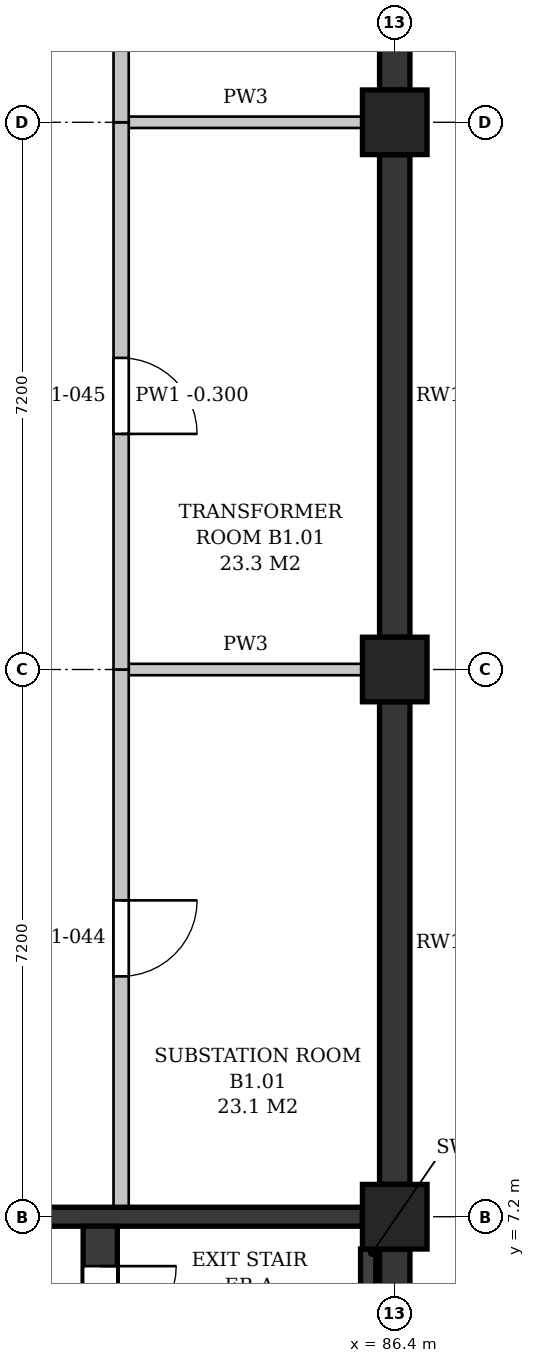
"""IFC4 building model, lengths in metres.
Left out: names, types, materials, properties, quantities, classifications, styles, units other than length and angle.
Written with IfcOpenShell. Run it as: python <this file> out.ifc"""

import sys

from ifc_helpers import new_model, si_unit, direction, frame, frame_2d, origin, origin_2d, place, context, subcontext, project, spatial, polyline, rectangle, outline, extrude, element, fill, save


model = new_model("IFC4")
c1 = context("Model", 3, precision=1e-05, world=origin(), true_north=direction((0.0, 1.0)))
c2 = subcontext(c1, "Body", "Model", "MODEL_VIEW")
j1 = project(units=[si_unit("LENGTHUNIT", "METRE"), si_unit("PLANEANGLEUNIT", "RADIAN")], contexts=[c1])
p1 = place(None, origin())
s1 = spatial("IfcSite", under=j1, at=p1, CompositionType="ELEMENT")
p2 = place(p1, origin())
s2 = spatial("IfcBuilding", under=s1, at=p2, CompositionType="ELEMENT")
p3 = place(p2, frame((0.0, 0.0, -4.5)))
s3 = spatial("IfcBuildingStorey", under=s2, at=p3, CompositionType="ELEMENT", Elevation=-4.5)
for number, where, z_axis, x_axis in (
    (1, (86.4, 7.2, 0.0), (0.0, 0.0, 1.0), (1.0, 0.0, 0.0)),
    (2, (86.4, 14.4, 0.0), (0.0, 0.0, 1.0), (1.0, 0.0, 0.0)),
    (3, (86.4, 21.6, 0.0), (0.0, 0.0, 1.0), (1.0, 0.0, 0.0)),
):
    element("IfcColumn", number, at=place(p3, frame(where, z_axis=z_axis, x_axis=x_axis)), inside=s3, PredefinedType="COLUMN", context=c2, shape_type="SweptSolid", body=[
        extrude(rectangle(XDim=0.85, YDim=0.85, at=origin_2d()), origin(), (0.0, 0.0, 1.0), 4.5),
    ])
p4 = place(p3, frame((86.4, 0.425, 0.0), z_axis=(0.0, 0.0, 1.0), x_axis=(0.0, 1.0, 0.0)))
e4 = element("IfcWall", 4, at=p4, inside=s3, PredefinedType="SOLIDWALL", context=c2, shape_type="SweptSolid", body=[
    extrude(rectangle(XDim=6.35, YDim=0.4, at=frame_2d((3.175, 0.0))), origin(), (0.0, 0.0, 1.0), 3.6),
])
for number, where, z_axis, x_axis in (
    (5, (86.4, 7.625, 0.0), (0.0, 0.0, 1.0), (0.0, 1.0, 0.0)),
    (6, (86.4, 14.825, 0.0), (0.0, 0.0, 1.0), (0.0, 1.0, 0.0)),
    (7, (86.4, 22.025, 0.0), (0.0, 0.0, 1.0), (0.0, 1.0, 0.0)),
):
    element("IfcWall", number, at=place(p3, frame(where, z_axis=z_axis, x_axis=x_axis)), inside=s3, PredefinedType="SOLIDWALL", context=c2, shape_type="SweptSolid", body=[
        extrude(rectangle(XDim=6.35, YDim=0.4, at=frame_2d((3.175, 0.0))), origin(), (0.0, 0.0, 1.0), 3.6),
    ])
p5 = place(p3, frame((79.625, 7.2, 0.0), z_axis=(0.0, 0.0, 1.0), x_axis=(1.0, 0.0, 0.0)))
e8 = element("IfcWall", 8, at=p5, inside=s3, PredefinedType="SHEAR", context=c2, shape_type="SweptSolid", body=[
    extrude(rectangle(XDim=6.35, YDim=0.25, at=frame_2d((3.175, 0.0))), origin(), (0.0, 0.0, 1.0), 3.4),
])
p6 = place(p5, frame((0.425, 0.0, 0.0)))
e9 = element("IfcOpeningElement", 9, at=p6, cuts=e8, PredefinedType="OPENING", context=c2, shape_type="SweptSolid", body=[
    extrude(rectangle(XDim=1.1, YDim=2.1, at=frame_2d((0.55, 1.05))), frame((0.0, 0.135, 0.0), z_axis=(0.0, -1.0, 0.0), x_axis=(1.0, 0.0, 0.0)), (0.0, 0.0, 1.0), 0.27),
])
p7 = place(p3, frame((86.05, 0.425, 0.0), z_axis=(0.0, 0.0, 1.0), x_axis=(0.0, 1.0, 0.0)))
e10 = element("IfcWall", 10, at=p7, inside=s3, PredefinedType="SHEAR", context=c2, shape_type="SweptSolid", body=[
    extrude(rectangle(XDim=6.35, YDim=0.2, at=frame_2d((3.175, 0.0))), origin(), (0.0, 0.0, 1.0), 4.2),
])
p8 = place(p3, frame((82.525, 0.2, 0.0), z_axis=(0.0, 0.0, 1.0), x_axis=(0.0, 1.0, 0.0)))
e11 = element("IfcWall", 11, at=p8, inside=s3, PredefinedType="SHEAR", context=c2, shape_type="SweptSolid", body=[
    extrude(rectangle(XDim=6.875, YDim=0.45, at=frame_2d((3.438, 0.0))), origin(), (0.0, 0.0, 1.0), 4.2),
])
p9 = place(p8, frame((5.35, 0.0, 0.0)))
e12 = element("IfcOpeningElement", 12, at=p9, cuts=e11, PredefinedType="OPENING", context=c2, shape_type="SweptSolid", body=[
    extrude(rectangle(XDim=1.0, YDim=2.1, at=frame_2d((0.5, 1.05))), frame((0.0, 0.235, 0.0), z_axis=(0.0, -1.0, 0.0), x_axis=(1.0, 0.0, 0.0)), (0.0, 0.0, 1.0), 0.47),
])
for number, where, z_axis, x_axis in (
    (13, (82.9, 14.4, 0.0), (0.0, 0.0, 1.0), (1.0, 0.0, 0.0)),
    (14, (82.9, 21.6, 0.0), (0.0, 0.0, 1.0), (1.0, 0.0, 0.0)),
):
    element("IfcWall", number, at=place(p3, frame(where, z_axis=z_axis, x_axis=x_axis)), inside=s3, PredefinedType="PARTITIONING", context=c2, shape_type="SweptSolid", body=[
        extrude(rectangle(XDim=3.075, YDim=0.15, at=frame_2d((1.538, 0.0))), origin(), (0.0, 0.0, 1.0), 3.4),
    ])
p10 = place(p3, frame((82.8, 7.325, 0.0), z_axis=(0.0, 0.0, 1.0), x_axis=(0.0, 1.0, 0.0)))
e15 = element("IfcWall", 15, at=p10, inside=s3, PredefinedType="PARTITIONING", context=c2, shape_type="SweptSolid", body=[
    extrude(outline(polyline([(0.0, 0.0), (7.075, 0.0), (7.075, 3.4), (6.775, 3.4), (6.775, 4.2), (0.175, 4.2), (0.175, 3.4), (0.0, 3.4), (0.0, 0.0)])), frame((0.0, 0.1, 0.0), z_axis=(0.0, -1.0, 0.0), x_axis=(1.0, 0.0, 0.0)), (0.0, 0.0, 1.0), 0.2),
])
p11 = place(p10, frame((3.037, 0.0, 0.0)))
e16 = element("IfcOpeningElement", 16, at=p11, cuts=e15, PredefinedType="OPENING", context=c2, shape_type="SweptSolid", body=[
    extrude(rectangle(XDim=1.0, YDim=2.1, at=frame_2d((0.5, 1.05))), frame((0.0, 0.11, 0.0), z_axis=(0.0, -1.0, 0.0), x_axis=(1.0, 0.0, 0.0)), (0.0, 0.0, 1.0), 0.22),
])
p12 = place(p3, frame((82.8, 14.4, 0.0), z_axis=(0.0, 0.0, 1.0), x_axis=(0.0, 1.0, 0.0)))
e17 = element("IfcWall", 17, at=p12, inside=s3, PredefinedType="PARTITIONING", context=c2, shape_type="SweptSolid", body=[
    extrude(outline(polyline([(0.0, 0.0), (7.2, 0.0), (7.2, 3.4), (6.9, 3.4), (6.9, 4.2), (0.3, 4.2), (0.3, 3.4), (0.0, 3.4), (0.0, 0.0)])), frame((0.0, 0.1, 0.0), z_axis=(0.0, -1.0, 0.0), x_axis=(1.0, 0.0, 0.0)), (0.0, 0.0, 1.0), 0.2),
])
p13 = place(p12, frame((3.1, 0.0, 0.0)))
e18 = element("IfcOpeningElement", 18, at=p13, cuts=e17, PredefinedType="OPENING", context=c2, shape_type="SweptSolid", body=[
    extrude(rectangle(XDim=1.0, YDim=2.1, at=frame_2d((0.5, 1.05))), frame((0.0, 0.11, 0.0), z_axis=(0.0, -1.0, 0.0), x_axis=(1.0, 0.0, 0.0)), (0.0, 0.0, 1.0), 0.22),
])
p14 = place(p3, frame((82.8, 21.6, 0.0), z_axis=(0.0, 0.0, 1.0), x_axis=(0.0, 1.0, 0.0)))
e19 = element("IfcWall", 19, at=p14, inside=s3, PredefinedType="PARTITIONING", context=c2, shape_type="SweptSolid", body=[
    extrude(outline(polyline([(0.0, 0.0), (7.2, 0.0), (7.2, 3.4), (6.9, 3.4), (6.9, 4.2), (0.3, 4.2), (0.3, 3.4), (0.0, 3.4), (0.0, 0.0)])), frame((0.0, 0.1, 0.0), z_axis=(0.0, -1.0, 0.0), x_axis=(1.0, 0.0, 0.0)), (0.0, 0.0, 1.0), 0.2),
])
p15 = place(p14, frame((3.1, 0.0, 0.0)))
e20 = element("IfcOpeningElement", 20, at=p15, cuts=e19, PredefinedType="OPENING", context=c2, shape_type="SweptSolid", body=[
    extrude(rectangle(XDim=1.0, YDim=2.1, at=frame_2d((0.5, 1.05))), frame((0.0, 0.11, 0.0), z_axis=(0.0, -1.0, 0.0), x_axis=(1.0, 0.0, 0.0)), (0.0, 0.0, 1.0), 0.22),
])
p16 = place(p9, frame((1.0, 0.0, 0.0), z_axis=(0.0, 0.0, 1.0), x_axis=(-1.0, 0.0, 0.0)))
e21 = element("IfcDoor", 21, at=p16, inside=s3, OperationType="SINGLE_SWING_LEFT", PredefinedType="DOOR", context=c2, shape_type="SweptSolid", body=[
    extrude(rectangle(XDim=1.0, YDim=2.1, at=frame_2d((0.5, 1.05))), frame((0.0, 0.025, 0.0), z_axis=(0.0, -1.0, 0.0), x_axis=(1.0, 0.0, 0.0)), (0.0, 0.0, 1.0), 0.05),
])
fill(e12, e21)
p17 = place(p11, frame((1.0, 0.0, 0.0), z_axis=(0.0, 0.0, 1.0), x_axis=(-1.0, 0.0, 0.0)))
e22 = element("IfcDoor", 22, at=p17, inside=s3, OperationType="SINGLE_SWING_LEFT", PredefinedType="DOOR", context=c2, shape_type="SweptSolid", body=[
    extrude(rectangle(XDim=1.0, YDim=2.1, at=frame_2d((0.5, 1.05))), frame((0.0, 0.025, 0.0), z_axis=(0.0, -1.0, 0.0), x_axis=(1.0, 0.0, 0.0)), (0.0, 0.0, 1.0), 0.05),
])
fill(e16, e22)
p18 = place(p13, frame((1.0, 0.0, 0.0), z_axis=(0.0, 0.0, 1.0), x_axis=(-1.0, 0.0, 0.0)))
e23 = element("IfcDoor", 23, at=p18, inside=s3, OperationType="SINGLE_SWING_RIGHT", PredefinedType="DOOR", context=c2, shape_type="SweptSolid", body=[
    extrude(rectangle(XDim=1.0, YDim=2.1, at=frame_2d((0.5, 1.05))), frame((0.0, 0.025, 0.0), z_axis=(0.0, -1.0, 0.0), x_axis=(1.0, 0.0, 0.0)), (0.0, 0.0, 1.0), 0.05),
])
fill(e18, e23)
save(model, sys.argv[1])
